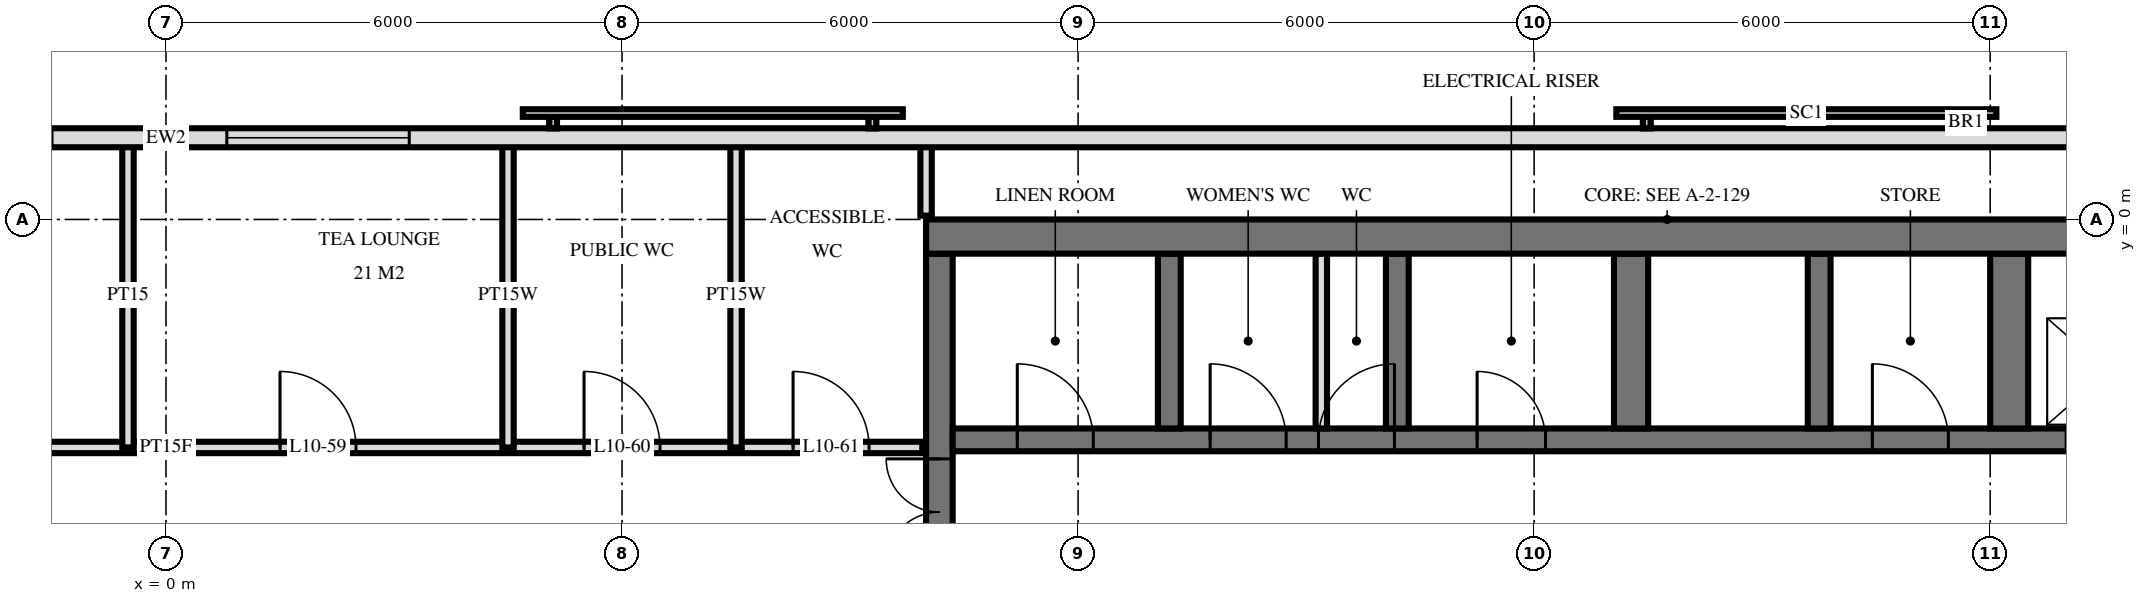
"""IFC4 building model, lengths in metres.
Left out: names, types, materials, properties, quantities, classifications, styles, units other than length and angle.
Written with IfcOpenShell. Run it as: python <this file> out.ifc"""

import sys

from ifc_helpers import new_model, si_unit, direction, frame, frame_2d, origin, place, context, subcontext, project, spatial, rectangle, extrude, element, fill, save


model = new_model("IFC4")
c1 = context("Model", 3, precision=1e-05, world=origin(), true_north=direction((0.0, 1.0)))
c2 = subcontext(c1, "Body", "Model", "MODEL_VIEW")
j1 = project(units=[si_unit("LENGTHUNIT", "METRE"), si_unit("PLANEANGLEUNIT", "RADIAN")], contexts=[c1])
p1 = place(None, origin())
s1 = spatial("IfcSite", under=j1, at=p1, CompositionType="ELEMENT")
p2 = place(p1, origin())
s2 = spatial("IfcBuilding", under=s1, at=p2, CompositionType="ELEMENT")
p3 = place(p2, frame((0.0, 0.0, 45.6)))
s3 = spatial("IfcBuildingStorey", under=s2, at=p3, CompositionType="ELEMENT", Elevation=45.6)
p4 = place(p3, frame((10.0, -0.225, 0.0), z_axis=(0.0, 0.0, 1.0), x_axis=(1.0, 0.0, 0.0)))
e1 = element("IfcWall", 1, at=p4, inside=s3, PredefinedType="SHEAR", context=c2, shape_type="SweptSolid", body=[
    extrude(rectangle(XDim=19.5, YDim=0.45, at=frame_2d((9.75, 0.0))), origin(), (0.0, 0.0, 1.0), 3.6),
])
p5 = place(p3, frame((10.175, -14.55, 0.0), z_axis=(0.0, 0.0, 1.0), x_axis=(0.0, 1.0, 0.0)))
e2 = element("IfcWall", 2, at=p5, inside=s3, PredefinedType="SHEAR", context=c2, shape_type="SweptSolid", body=[
    extrude(rectangle(XDim=14.1, YDim=0.35, at=frame_2d((7.05, 0.0))), origin(), (0.0, 0.0, 1.0), 3.6),
])
p6 = place(p5, frame((8.4, 0.0, 0.0)))
e3 = element("IfcOpeningElement", 3, at=p6, cuts=e2, PredefinedType="OPENING", context=c2, shape_type="SweptSolid", body=[
    extrude(rectangle(XDim=1.4, YDim=2.4, at=frame_2d((0.7, 1.2))), frame((0.0, 0.185, 0.0), z_axis=(0.0, -1.0, 0.0), x_axis=(1.0, 0.0, 0.0)), (0.0, 0.0, 1.0), 0.37),
])
p7 = place(p5, frame((10.0, 0.0, 0.0)))
e4 = element("IfcOpeningElement", 4, at=p7, cuts=e2, PredefinedType="OPENING", context=c2, shape_type="SweptSolid", body=[
    extrude(rectangle(XDim=1.4, YDim=2.4, at=frame_2d((0.7, 1.2))), frame((0.0, 0.185, 0.0), z_axis=(0.0, -1.0, 0.0), x_axis=(1.0, 0.0, 0.0)), (0.0, 0.0, 1.0), 0.37),
])
p8 = place(p5, frame((4.0, 0.0, 0.0)))
e5 = element("IfcOpeningElement", 5, at=p8, cuts=e2, PredefinedType="OPENING", context=c2, shape_type="SweptSolid", body=[
    extrude(rectangle(XDim=1.2, YDim=2.1, at=frame_2d((0.6, 1.05))), frame((0.0, 0.185, 0.0), z_axis=(0.0, -1.0, 0.0), x_axis=(1.0, 0.0, 0.0)), (0.0, 0.0, 1.0), 0.37),
])
p9 = place(p3, frame((10.35, -2.9, 0.0), z_axis=(0.0, 0.0, 1.0), x_axis=(1.0, 0.0, 0.0)))
e6 = element("IfcWall", 6, at=p9, inside=s3, PredefinedType="SHEAR", context=c2, shape_type="SweptSolid", body=[
    extrude(rectangle(XDim=18.7, YDim=0.3, at=frame_2d((9.35, 0.0))), origin(), (0.0, 0.0, 1.0), 3.6),
])
p10 = place(p9, frame((14.65, 0.0, 0.0)))
e7 = element("IfcOpeningElement", 7, at=p10, cuts=e6, PredefinedType="OPENING", context=c2, shape_type="SweptSolid", body=[
    extrude(rectangle(XDim=1.1, YDim=2.1, at=frame_2d((0.55, 1.05))), frame((0.0, 0.16, 0.0), z_axis=(0.0, -1.0, 0.0), x_axis=(1.0, 0.0, 0.0)), (0.0, 0.0, 1.0), 0.32),
])
p11 = place(p9, frame((17.05, 0.0, 0.0)))
e8 = element("IfcOpeningElement", 8, at=p11, cuts=e6, PredefinedType="OPENING", context=c2, shape_type="SweptSolid", body=[
    extrude(rectangle(XDim=1.1, YDim=2.1, at=frame_2d((0.55, 1.05))), frame((0.0, 0.16, 0.0), z_axis=(0.0, -1.0, 0.0), x_axis=(1.0, 0.0, 0.0)), (0.0, 0.0, 1.0), 0.32),
])
p12 = place(p9, frame((6.9, 0.0, 0.0)))
e9 = element("IfcOpeningElement", 9, at=p12, cuts=e6, PredefinedType="OPENING", context=c2, shape_type="SweptSolid", body=[
    extrude(rectangle(XDim=0.9, YDim=2.1, at=frame_2d((0.45, 1.05))), frame((0.0, 0.16, 0.0), z_axis=(0.0, -1.0, 0.0), x_axis=(1.0, 0.0, 0.0)), (0.0, 0.0, 1.0), 0.32),
])
p13 = place(p9, frame((0.85, 0.0, 0.0)))
e10 = element("IfcOpeningElement", 10, at=p13, cuts=e6, PredefinedType="OPENING", context=c2, shape_type="SweptSolid", body=[
    extrude(rectangle(XDim=1.0, YDim=2.1, at=frame_2d((0.5, 1.05))), frame((0.0, 0.16, 0.0), z_axis=(0.0, -1.0, 0.0), x_axis=(1.0, 0.0, 0.0)), (0.0, 0.0, 1.0), 0.32),
])
p14 = place(p9, frame((3.387, 0.0, 0.0)))
e11 = element("IfcOpeningElement", 11, at=p14, cuts=e6, PredefinedType="OPENING", context=c2, shape_type="SweptSolid", body=[
    extrude(rectangle(XDim=1.0, YDim=2.1, at=frame_2d((0.5, 1.05))), frame((0.0, 0.16, 0.0), z_axis=(0.0, -1.0, 0.0), x_axis=(1.0, 0.0, 0.0)), (0.0, 0.0, 1.0), 0.32),
])
p15 = place(p9, frame((4.812, 0.0, 0.0)))
e12 = element("IfcOpeningElement", 12, at=p15, cuts=e6, PredefinedType="OPENING", context=c2, shape_type="SweptSolid", body=[
    extrude(rectangle(XDim=1.0, YDim=2.1, at=frame_2d((0.5, 1.05))), frame((0.0, 0.16, 0.0), z_axis=(0.0, -1.0, 0.0), x_axis=(1.0, 0.0, 0.0)), (0.0, 0.0, 1.0), 0.32),
])
p16 = place(p9, frame((12.1, 0.0, 0.0)))
e13 = element("IfcOpeningElement", 13, at=p16, cuts=e6, PredefinedType="OPENING", context=c2, shape_type="SweptSolid", body=[
    extrude(rectangle(XDim=1.0, YDim=2.1, at=frame_2d((0.5, 1.05))), frame((0.0, 0.16, 0.0), z_axis=(0.0, -1.0, 0.0), x_axis=(1.0, 0.0, 0.0)), (0.0, 0.0, 1.0), 0.32),
])
for number, where, z_axis, x_axis in (
    (14, (13.2, -2.75, 0.0), (0.0, 0.0, 1.0), (0.0, 1.0, 0.0)),
    (15, (16.2, -2.75, 0.0), (0.0, 0.0, 1.0), (0.0, 1.0, 0.0)),
):
    element("IfcWall", number, at=place(p3, frame(where, z_axis=z_axis, x_axis=x_axis)), inside=s3, PredefinedType="SHEAR", context=c2, shape_type="SweptSolid", body=[
        extrude(rectangle(XDim=2.3, YDim=0.3, at=frame_2d((1.15, 0.0))), origin(), (0.0, 0.0, 1.0), 3.6),
    ])
p17 = place(p3, frame((19.275, -2.75, 0.0), z_axis=(0.0, 0.0, 1.0), x_axis=(0.0, 1.0, 0.0)))
e16 = element("IfcWall", 16, at=p17, inside=s3, PredefinedType="SHEAR", context=c2, shape_type="SweptSolid", body=[
    extrude(rectangle(XDim=2.3, YDim=0.45, at=frame_2d((1.15, 0.0))), origin(), (0.0, 0.0, 1.0), 3.6),
])
p18 = place(p3, frame((21.75, -2.75, 0.0), z_axis=(0.0, 0.0, 1.0), x_axis=(0.0, 1.0, 0.0)))
e17 = element("IfcWall", 17, at=p18, inside=s3, PredefinedType="SHEAR", context=c2, shape_type="SweptSolid", body=[
    extrude(rectangle(XDim=2.3, YDim=0.3, at=frame_2d((1.15, 0.0))), origin(), (0.0, 0.0, 1.0), 3.6),
])
p19 = place(p3, frame((24.25, -2.75, 0.0), z_axis=(0.0, 0.0, 1.0), x_axis=(0.0, 1.0, 0.0)))
e18 = element("IfcWall", 18, at=p19, inside=s3, PredefinedType="SHEAR", context=c2, shape_type="SweptSolid", body=[
    extrude(rectangle(XDim=2.3, YDim=0.5, at=frame_2d((1.15, 0.0))), origin(), (0.0, 0.0, 1.0), 3.6),
])
p20 = place(p3, frame((28.775, 1.075, 0.0), z_axis=(0.0, 0.0, 1.0), x_axis=(-1.0, 0.0, 0.0)))
e19 = element("IfcWall", 19, at=p20, inside=s3, PredefinedType="SOLIDWALL", context=c2, shape_type="SweptSolid", body=[
    extrude(rectangle(XDim=57.551, YDim=0.25, at=frame_2d((28.775, 0.0))), origin(), (0.0, 0.0, 1.0), 3.32),
])
p21 = place(p20, frame((25.575, 0.0, 0.3)))
e20 = element("IfcOpeningElement", 20, at=p21, cuts=e19, PredefinedType="OPENING", context=c2, shape_type="SweptSolid", body=[
    extrude(rectangle(XDim=2.4, YDim=2.1, at=frame_2d((1.2, 1.05))), frame((0.0, 0.135, 0.0), z_axis=(0.0, -1.0, 0.0), x_axis=(1.0, 0.0, 0.0)), (0.0, 0.0, 1.0), 0.27),
])
p22 = place(p20, frame((30.275, 0.0, 0.3)))
e21 = element("IfcOpeningElement", 21, at=p22, cuts=e19, PredefinedType="OPENING", context=c2, shape_type="SweptSolid", body=[
    extrude(rectangle(XDim=2.4, YDim=2.1, at=frame_2d((1.2, 1.05))), frame((0.0, 0.135, 0.0), z_axis=(0.0, -1.0, 0.0), x_axis=(1.0, 0.0, 0.0)), (0.0, 0.0, 1.0), 0.27),
])
p23 = place(p20, frame((33.275, 0.0, 0.3)))
e22 = element("IfcOpeningElement", 22, at=p23, cuts=e19, PredefinedType="OPENING", context=c2, shape_type="SweptSolid", body=[
    extrude(rectangle(XDim=2.4, YDim=2.1, at=frame_2d((1.2, 1.05))), frame((0.0, 0.135, 0.0), z_axis=(0.0, -1.0, 0.0), x_axis=(1.0, 0.0, 0.0)), (0.0, 0.0, 1.0), 0.27),
])
p24 = place(p3, frame((15.2, -2.75, 0.0), z_axis=(0.0, 0.0, 1.0), x_axis=(0.0, 1.0, 0.0)))
e23 = element("IfcWall", 23, at=p24, inside=s3, PredefinedType="PARTITIONING", context=c2, shape_type="SweptSolid", body=[
    extrude(rectangle(XDim=2.3, YDim=0.15, at=frame_2d((1.15, 0.0))), origin(), (0.0, 0.0, 1.0), 3.3),
])
p25 = place(p3, frame((10.0, 0.05, 0.0), z_axis=(0.0, 0.0, 1.0), x_axis=(0.0, 1.0, 0.0)))
e24 = element("IfcWall", 24, at=p25, inside=s3, PredefinedType="PLUMBINGWALL", context=c2, shape_type="SweptSolid", body=[
    extrude(rectangle(XDim=0.97, YDim=0.15, at=frame_2d((0.485, 0.0))), origin(), (0.0, 0.0, 1.0), 3.32),
])
for number, where, z_axis, x_axis in (
    (25, (7.5, -3.0, 0.0), (0.0, 0.0, 1.0), (0.0, 1.0, 0.0)),
    (26, (4.5, -3.0, 0.0), (0.0, 0.0, 1.0), (0.0, 1.0, 0.0)),
):
    element("IfcWall", number, at=place(p3, frame(where, z_axis=z_axis, x_axis=x_axis)), inside=s3, PredefinedType="PLUMBINGWALL", context=c2, shape_type="SweptSolid", body=[
        extrude(rectangle(XDim=4.02, YDim=0.15, at=frame_2d((2.01, 0.0))), origin(), (0.0, 0.0, 1.0), 3.32),
    ])
p26 = place(p3, frame((-0.5, -3.0, 0.0), z_axis=(0.0, 0.0, 1.0), x_axis=(0.0, 1.0, 0.0)))
e27 = element("IfcWall", 27, at=p26, inside=s3, PredefinedType="PARTITIONING", context=c2, shape_type="SweptSolid", body=[
    extrude(rectangle(XDim=4.02, YDim=0.15, at=frame_2d((2.01, 0.0))), origin(), (0.0, 0.0, 1.0), 3.32),
])
p27 = place(p3, frame((-9.95, -3.0, 0.0), z_axis=(0.0, 0.0, 1.0), x_axis=(1.0, 0.0, 0.0)))
e28 = element("IfcWall", 28, at=p27, inside=s3, PredefinedType="PARTITIONING", context=c2, shape_type="SweptSolid", body=[
    extrude(rectangle(XDim=19.9, YDim=0.15, at=frame_2d((9.95, 0.0))), origin(), (0.0, 0.0, 1.0), 3.32),
])
p28 = place(p27, frame((4.2, 0.0, 0.0)))
e29 = element("IfcOpeningElement", 29, at=p28, cuts=e28, PredefinedType="OPENING", context=c2, shape_type="SweptSolid", body=[
    extrude(rectangle(XDim=1.0, YDim=2.1, at=frame_2d((0.5, 1.05))), frame((0.0, 0.085, 0.0), z_axis=(0.0, -1.0, 0.0), x_axis=(1.0, 0.0, 0.0)), (0.0, 0.0, 1.0), 0.17),
])
p29 = place(p27, frame((11.45, 0.0, 0.0)))
e30 = element("IfcOpeningElement", 30, at=p29, cuts=e28, PredefinedType="OPENING", context=c2, shape_type="SweptSolid", body=[
    extrude(rectangle(XDim=1.0, YDim=2.1, at=frame_2d((0.5, 1.05))), frame((0.0, 0.085, 0.0), z_axis=(0.0, -1.0, 0.0), x_axis=(1.0, 0.0, 0.0)), (0.0, 0.0, 1.0), 0.17),
])
p30 = place(p27, frame((15.45, 0.0, 0.0)))
e31 = element("IfcOpeningElement", 31, at=p30, cuts=e28, PredefinedType="OPENING", context=c2, shape_type="SweptSolid", body=[
    extrude(rectangle(XDim=1.0, YDim=2.1, at=frame_2d((0.5, 1.05))), frame((0.0, 0.085, 0.0), z_axis=(0.0, -1.0, 0.0), x_axis=(1.0, 0.0, 0.0)), (0.0, 0.0, 1.0), 0.17),
])
p31 = place(p27, frame((18.2, 0.0, 0.0)))
e32 = element("IfcOpeningElement", 32, at=p31, cuts=e28, PredefinedType="OPENING", context=c2, shape_type="SweptSolid", body=[
    extrude(rectangle(XDim=1.0, YDim=2.1, at=frame_2d((0.5, 1.05))), frame((0.0, 0.085, 0.0), z_axis=(0.0, -1.0, 0.0), x_axis=(1.0, 0.0, 0.0)), (0.0, 0.0, 1.0), 0.17),
])
p32 = place(p21, origin())
e33 = element("IfcWindow", 33, at=p32, inside=s3, PartitioningType="SINGLE_PANEL", PredefinedType="WINDOW", context=c2, shape_type="SweptSolid", body=[
    extrude(rectangle(XDim=2.4, YDim=2.1, at=frame_2d((1.2, 1.05))), frame((0.0, 0.03, 0.0), z_axis=(0.0, -1.0, 0.0), x_axis=(1.0, 0.0, 0.0)), (0.0, 0.0, 1.0), 0.06),
])
fill(e20, e33)
p33 = place(p7, origin())
e34 = element("IfcDoor", 34, at=p33, inside=s3, OperationType="DOUBLE_DOOR_SINGLE_SWING", PredefinedType="DOOR", context=c2, shape_type="SweptSolid", body=[
    extrude(rectangle(XDim=1.4, YDim=2.4, at=frame_2d((0.7, 1.2))), frame((0.0, 0.025, 0.0), z_axis=(0.0, -1.0, 0.0), x_axis=(1.0, 0.0, 0.0)), (0.0, 0.0, 1.0), 0.05),
])
fill(e4, e34)
p34 = place(p12, origin())
e35 = element("IfcDoor", 35, at=p34, inside=s3, OperationType="SINGLE_SWING_RIGHT", PredefinedType="DOOR", context=c2, shape_type="SweptSolid", body=[
    extrude(rectangle(XDim=0.9, YDim=2.1, at=frame_2d((0.45, 1.05))), frame((0.0, 0.025, 0.0), z_axis=(0.0, -1.0, 0.0), x_axis=(1.0, 0.0, 0.0)), (0.0, 0.0, 1.0), 0.05),
])
fill(e9, e35)
p35 = place(p13, origin())
e36 = element("IfcDoor", 36, at=p35, inside=s3, OperationType="SINGLE_SWING_RIGHT", PredefinedType="DOOR", context=c2, shape_type="SweptSolid", body=[
    extrude(rectangle(XDim=1.0, YDim=2.1, at=frame_2d((0.5, 1.05))), frame((0.0, 0.025, 0.0), z_axis=(0.0, -1.0, 0.0), x_axis=(1.0, 0.0, 0.0)), (0.0, 0.0, 1.0), 0.05),
])
fill(e10, e36)
p36 = place(p14, origin())
e37 = element("IfcDoor", 37, at=p36, inside=s3, OperationType="SINGLE_SWING_RIGHT", PredefinedType="DOOR", context=c2, shape_type="SweptSolid", body=[
    extrude(rectangle(XDim=1.0, YDim=2.1, at=frame_2d((0.5, 1.05))), frame((0.0, 0.025, 0.0), z_axis=(0.0, -1.0, 0.0), x_axis=(1.0, 0.0, 0.0)), (0.0, 0.0, 1.0), 0.05),
])
fill(e11, e37)
p37 = place(p15, origin())
e38 = element("IfcDoor", 38, at=p37, inside=s3, OperationType="SINGLE_SWING_LEFT", PredefinedType="DOOR", context=c2, shape_type="SweptSolid", body=[
    extrude(rectangle(XDim=1.0, YDim=2.1, at=frame_2d((0.5, 1.05))), frame((0.0, 0.025, 0.0), z_axis=(0.0, -1.0, 0.0), x_axis=(1.0, 0.0, 0.0)), (0.0, 0.0, 1.0), 0.05),
])
fill(e12, e38)
p38 = place(p16, origin())
e39 = element("IfcDoor", 39, at=p38, inside=s3, OperationType="SINGLE_SWING_RIGHT", PredefinedType="DOOR", context=c2, shape_type="SweptSolid", body=[
    extrude(rectangle(XDim=1.0, YDim=2.1, at=frame_2d((0.5, 1.05))), frame((0.0, 0.025, 0.0), z_axis=(0.0, -1.0, 0.0), x_axis=(1.0, 0.0, 0.0)), (0.0, 0.0, 1.0), 0.05),
])
fill(e13, e39)
p39 = place(p29, origin())
e40 = element("IfcDoor", 40, at=p39, inside=s3, OperationType="SINGLE_SWING_RIGHT", PredefinedType="DOOR", context=c2, shape_type="SweptSolid", body=[
    extrude(rectangle(XDim=1.0, YDim=2.1, at=frame_2d((0.5, 1.05))), frame((0.0, 0.025, 0.0), z_axis=(0.0, -1.0, 0.0), x_axis=(1.0, 0.0, 0.0)), (0.0, 0.0, 1.0), 0.05),
])
fill(e30, e40)
p40 = place(p30, origin())
e41 = element("IfcDoor", 41, at=p40, inside=s3, OperationType="SINGLE_SWING_RIGHT", PredefinedType="DOOR", context=c2, shape_type="SweptSolid", body=[
    extrude(rectangle(XDim=1.0, YDim=2.1, at=frame_2d((0.5, 1.05))), frame((0.0, 0.025, 0.0), z_axis=(0.0, -1.0, 0.0), x_axis=(1.0, 0.0, 0.0)), (0.0, 0.0, 1.0), 0.05),
])
fill(e31, e41)
p41 = place(p31, origin())
e42 = element("IfcDoor", 42, at=p41, inside=s3, OperationType="SINGLE_SWING_RIGHT", PredefinedType="DOOR", context=c2, shape_type="SweptSolid", body=[
    extrude(rectangle(XDim=1.0, YDim=2.1, at=frame_2d((0.5, 1.05))), frame((0.0, 0.025, 0.0), z_axis=(0.0, -1.0, 0.0), x_axis=(1.0, 0.0, 0.0)), (0.0, 0.0, 1.0), 0.05),
])
fill(e32, e42)
save(model, sys.argv[1])
